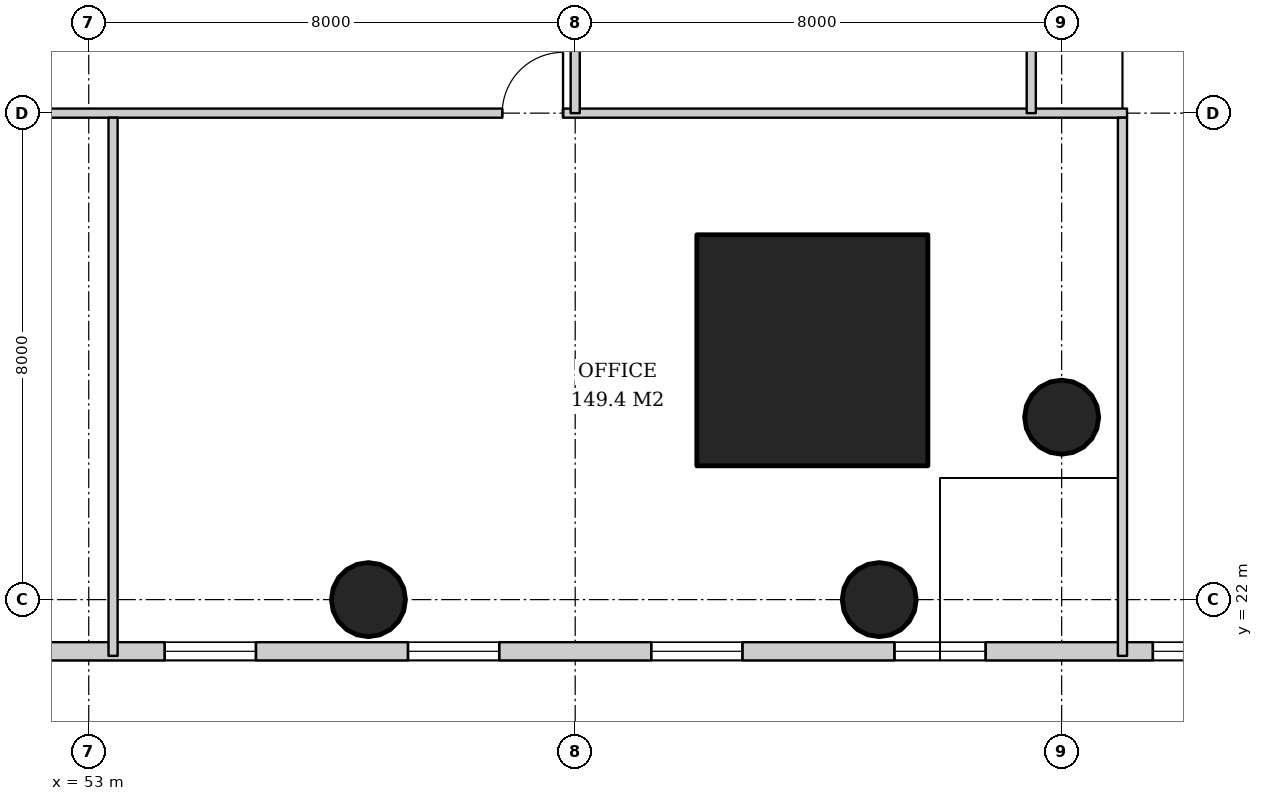
"""IFC4 building model, lengths in metres.
Left out: names, types, materials, properties, quantities, classifications, styles, units other than length and angle.
Written with IfcOpenShell. Run it as: python <this file> out.ifc"""

import sys

from ifc_helpers import new_model, si_unit, direction, frame, frame_2d, origin, origin_2d, place, context, subcontext, project, spatial, rectangle, hollow_circle, extrude, element, fill, save


model = new_model("IFC4")
c1 = context("Model", 3, precision=1e-05, world=origin(), true_north=direction((0.0, 1.0)))
c2 = subcontext(c1, "Body", "Model", "MODEL_VIEW")
j1 = project(units=[si_unit("LENGTHUNIT", "METRE"), si_unit("PLANEANGLEUNIT", "RADIAN")], contexts=[c1])
p1 = place(None, origin())
s1 = spatial("IfcSite", under=j1, at=p1, CompositionType="ELEMENT")
p2 = place(p1, origin())
s2 = spatial("IfcBuilding", under=s1, at=p2, CompositionType="ELEMENT")
p3 = place(p2, frame((0.0, 0.0, 16.0)))
s3 = spatial("IfcBuildingStorey", under=s2, at=p3, CompositionType="ELEMENT", Elevation=16.0)
p4 = place(p3, frame((69.0, 25.0, 0.0), z_axis=(0.0, 0.0, 1.0), x_axis=(1.0, 0.0, 0.0)))
e1 = element("IfcColumn", 1, at=p4, inside=s3, PredefinedType="COLUMN", context=c2, shape_type="SweptSolid", body=[
    extrude(hollow_circle(Radius=0.61, WallThickness=0.04, at=origin_2d()), origin(), (0.0, 0.0, 1.0), 5.0),
])
p5 = place(p3, frame((64.9, 26.1, 0.0), z_axis=(0.0, 0.0, 1.0), x_axis=(1.0, 0.0, 0.0)))
e2 = element("IfcColumn", 2, at=p5, inside=s3, PredefinedType="COLUMN", context=c2, shape_type="SweptSolid", body=[
    extrude(rectangle(XDim=3.8, YDim=3.8, at=origin_2d()), origin(), (0.0, 0.0, 1.0), 5.0),
])
for number, where, z_axis, x_axis in (
    (3, (66.0, 22.0, 0.0), (0.0, 0.0, 1.0), (1.0, 0.0, 0.0)),
    (4, (57.6, 22.0, 0.0), (0.0, 0.0, 1.0), (1.0, 0.0, 0.0)),
):
    element("IfcColumn", number, at=place(p3, frame(where, z_axis=z_axis, x_axis=x_axis)), inside=s3, PredefinedType="COLUMN", context=c2, shape_type="SweptSolid", body=[
        extrude(hollow_circle(Radius=0.61, WallThickness=0.04, at=origin_2d()), origin(), (0.0, 0.0, 1.0), 5.0),
    ])
p6 = place(p3, frame((20.0, 21.15, 0.0), z_axis=(0.0, 0.0, 1.0), x_axis=(1.0, 0.0, 0.0)))
e5 = element("IfcWall", 5, at=p6, inside=s3, PredefinedType="SOLIDWALL", context=c2, shape_type="SweptSolid", body=[
    extrude(rectangle(XDim=58.0, YDim=0.3, at=frame_2d((29.0, 0.0))), origin(), (0.0, 0.0, 1.0), 4.7),
])
p7 = place(p6, frame((1.5, 0.0, 0.9)))
e6 = element("IfcOpeningElement", 6, at=p7, cuts=e5, PredefinedType="OPENING", context=c2, shape_type="SweptSolid", body=[
    extrude(rectangle(XDim=1.5, YDim=3.2, at=frame_2d((0.75, 1.6))), frame((0.0, 0.16, 0.0), z_axis=(0.0, -1.0, 0.0), x_axis=(1.0, 0.0, 0.0)), (0.0, 0.0, 1.0), 0.32),
])
p8 = place(p6, frame((6.0, 0.0, 0.9)))
e7 = element("IfcOpeningElement", 7, at=p8, cuts=e5, PredefinedType="OPENING", context=c2, shape_type="SweptSolid", body=[
    extrude(rectangle(XDim=1.5, YDim=3.2, at=frame_2d((0.75, 1.6))), frame((0.0, 0.16, 0.0), z_axis=(0.0, -1.0, 0.0), x_axis=(1.0, 0.0, 0.0)), (0.0, 0.0, 1.0), 0.32),
])
p9 = place(p6, frame((10.25, 0.0, 0.9)))
e8 = element("IfcOpeningElement", 8, at=p9, cuts=e5, PredefinedType="OPENING", context=c2, shape_type="SweptSolid", body=[
    extrude(rectangle(XDim=1.5, YDim=3.2, at=frame_2d((0.75, 1.6))), frame((0.0, 0.16, 0.0), z_axis=(0.0, -1.0, 0.0), x_axis=(1.0, 0.0, 0.0)), (0.0, 0.0, 1.0), 0.32),
])
p10 = place(p6, frame((14.25, 0.0, 0.9)))
e9 = element("IfcOpeningElement", 9, at=p10, cuts=e5, PredefinedType="OPENING", context=c2, shape_type="SweptSolid", body=[
    extrude(rectangle(XDim=1.5, YDim=3.2, at=frame_2d((0.75, 1.6))), frame((0.0, 0.16, 0.0), z_axis=(0.0, -1.0, 0.0), x_axis=(1.0, 0.0, 0.0)), (0.0, 0.0, 1.0), 0.32),
])
p11 = place(p6, frame((18.25, 0.0, 0.9)))
e10 = element("IfcOpeningElement", 10, at=p11, cuts=e5, PredefinedType="OPENING", context=c2, shape_type="SweptSolid", body=[
    extrude(rectangle(XDim=1.5, YDim=3.2, at=frame_2d((0.75, 1.6))), frame((0.0, 0.16, 0.0), z_axis=(0.0, -1.0, 0.0), x_axis=(1.0, 0.0, 0.0)), (0.0, 0.0, 1.0), 0.32),
])
p12 = place(p6, frame((22.25, 0.0, 0.9)))
e11 = element("IfcOpeningElement", 11, at=p12, cuts=e5, PredefinedType="OPENING", context=c2, shape_type="SweptSolid", body=[
    extrude(rectangle(XDim=1.5, YDim=3.2, at=frame_2d((0.75, 1.6))), frame((0.0, 0.16, 0.0), z_axis=(0.0, -1.0, 0.0), x_axis=(1.0, 0.0, 0.0)), (0.0, 0.0, 1.0), 0.32),
])
p13 = place(p6, frame((26.25, 0.0, 0.9)))
e12 = element("IfcOpeningElement", 12, at=p13, cuts=e5, PredefinedType="OPENING", context=c2, shape_type="SweptSolid", body=[
    extrude(rectangle(XDim=1.5, YDim=3.2, at=frame_2d((0.75, 1.6))), frame((0.0, 0.16, 0.0), z_axis=(0.0, -1.0, 0.0), x_axis=(1.0, 0.0, 0.0)), (0.0, 0.0, 1.0), 0.32),
])
p14 = place(p6, frame((30.25, 0.0, 0.9)))
e13 = element("IfcOpeningElement", 13, at=p14, cuts=e5, PredefinedType="OPENING", context=c2, shape_type="SweptSolid", body=[
    extrude(rectangle(XDim=1.5, YDim=3.2, at=frame_2d((0.75, 1.6))), frame((0.0, 0.16, 0.0), z_axis=(0.0, -1.0, 0.0), x_axis=(1.0, 0.0, 0.0)), (0.0, 0.0, 1.0), 0.32),
])
p15 = place(p6, frame((34.25, 0.0, 0.9)))
e14 = element("IfcOpeningElement", 14, at=p15, cuts=e5, PredefinedType="OPENING", context=c2, shape_type="SweptSolid", body=[
    extrude(rectangle(XDim=1.5, YDim=3.2, at=frame_2d((0.75, 1.6))), frame((0.0, 0.16, 0.0), z_axis=(0.0, -1.0, 0.0), x_axis=(1.0, 0.0, 0.0)), (0.0, 0.0, 1.0), 0.32),
])
p16 = place(p6, frame((38.25, 0.0, 0.9)))
e15 = element("IfcOpeningElement", 15, at=p16, cuts=e5, PredefinedType="OPENING", context=c2, shape_type="SweptSolid", body=[
    extrude(rectangle(XDim=1.5, YDim=3.2, at=frame_2d((0.75, 1.6))), frame((0.0, 0.16, 0.0), z_axis=(0.0, -1.0, 0.0), x_axis=(1.0, 0.0, 0.0)), (0.0, 0.0, 1.0), 0.32),
])
p17 = place(p6, frame((42.25, 0.0, 0.9)))
e16 = element("IfcOpeningElement", 16, at=p17, cuts=e5, PredefinedType="OPENING", context=c2, shape_type="SweptSolid", body=[
    extrude(rectangle(XDim=1.5, YDim=3.2, at=frame_2d((0.75, 1.6))), frame((0.0, 0.16, 0.0), z_axis=(0.0, -1.0, 0.0), x_axis=(1.0, 0.0, 0.0)), (0.0, 0.0, 1.0), 0.32),
])
p18 = place(p6, frame((46.25, 0.0, 0.9)))
e17 = element("IfcOpeningElement", 17, at=p18, cuts=e5, PredefinedType="OPENING", context=c2, shape_type="SweptSolid", body=[
    extrude(rectangle(XDim=1.5, YDim=3.2, at=frame_2d((0.75, 1.6))), frame((0.0, 0.16, 0.0), z_axis=(0.0, -1.0, 0.0), x_axis=(1.0, 0.0, 0.0)), (0.0, 0.0, 1.0), 0.32),
])
p19 = place(p6, frame((50.5, 0.0, 0.9)))
e18 = element("IfcOpeningElement", 18, at=p19, cuts=e5, PredefinedType="OPENING", context=c2, shape_type="SweptSolid", body=[
    extrude(rectangle(XDim=1.5, YDim=3.2, at=frame_2d((0.75, 1.6))), frame((0.0, 0.16, 0.0), z_axis=(0.0, -1.0, 0.0), x_axis=(1.0, 0.0, 0.0)), (0.0, 0.0, 1.0), 0.32),
])
p20 = place(p6, frame((55.0, 0.0, 0.9)))
e19 = element("IfcOpeningElement", 19, at=p20, cuts=e5, PredefinedType="OPENING", context=c2, shape_type="SweptSolid", body=[
    extrude(rectangle(XDim=1.5, YDim=3.2, at=frame_2d((0.75, 1.6))), frame((0.0, 0.16, 0.0), z_axis=(0.0, -1.0, 0.0), x_axis=(1.0, 0.0, 0.0)), (0.0, 0.0, 1.0), 0.32),
])
p21 = place(p3, frame((19.925, 30.0, 0.0), z_axis=(0.0, 0.0, 1.0), x_axis=(1.0, 0.0, 0.0)))
e20 = element("IfcWall", 20, at=p21, inside=s3, PredefinedType="PARTITIONING", context=c2, shape_type="SweptSolid", body=[
    extrude(rectangle(XDim=50.15, YDim=0.15, at=frame_2d((25.075, 0.0))), origin(), (0.0, 0.0, 1.0), 3.688),
])
p22 = place(p21, frame((7.625, 0.0, 0.0)))
e21 = element("IfcOpeningElement", 21, at=p22, cuts=e20, PredefinedType="OPENING", context=c2, shape_type="SweptSolid", body=[
    extrude(rectangle(XDim=1.5, YDim=2.1, at=frame_2d((0.75, 1.05))), frame((0.0, 0.085, 0.0), z_axis=(0.0, -1.0, 0.0), x_axis=(1.0, 0.0, 0.0)), (0.0, 0.0, 1.0), 0.17),
])
p23 = place(p21, frame((20.375, 0.0, 0.0)))
e22 = element("IfcOpeningElement", 22, at=p23, cuts=e20, PredefinedType="OPENING", context=c2, shape_type="SweptSolid", body=[
    extrude(rectangle(XDim=1.0, YDim=2.1, at=frame_2d((0.5, 1.05))), frame((0.0, 0.085, 0.0), z_axis=(0.0, -1.0, 0.0), x_axis=(1.0, 0.0, 0.0)), (0.0, 0.0, 1.0), 0.17),
])
p24 = place(p21, frame((28.775, 0.0, 0.0)))
e23 = element("IfcOpeningElement", 23, at=p24, cuts=e20, PredefinedType="OPENING", context=c2, shape_type="SweptSolid", body=[
    extrude(rectangle(XDim=1.0, YDim=2.1, at=frame_2d((0.5, 1.05))), frame((0.0, 0.085, 0.0), z_axis=(0.0, -1.0, 0.0), x_axis=(1.0, 0.0, 0.0)), (0.0, 0.0, 1.0), 0.17),
])
p25 = place(p21, frame((39.875, 0.0, 0.0)))
e24 = element("IfcOpeningElement", 24, at=p25, cuts=e20, PredefinedType="OPENING", context=c2, shape_type="SweptSolid", body=[
    extrude(rectangle(XDim=1.0, YDim=2.1, at=frame_2d((0.5, 1.05))), frame((0.0, 0.085, 0.0), z_axis=(0.0, -1.0, 0.0), x_axis=(1.0, 0.0, 0.0)), (0.0, 0.0, 1.0), 0.17),
])
p26 = place(p3, frame((70.0, 21.075, 0.0), z_axis=(0.0, 0.0, 1.0), x_axis=(0.0, 1.0, 0.0)))
e25 = element("IfcWall", 25, at=p26, inside=s3, PredefinedType="PARTITIONING", context=c2, shape_type="SweptSolid", body=[
    extrude(rectangle(XDim=8.85, YDim=0.15, at=frame_2d((4.425, 0.0))), origin(), (0.0, 0.0, 1.0), 4.7),
])
p27 = place(p3, frame((53.4, 21.075, 0.0), z_axis=(0.0, 0.0, 1.0), x_axis=(0.0, 1.0, 0.0)))
e26 = element("IfcWall", 26, at=p27, inside=s3, PredefinedType="PARTITIONING", context=c2, shape_type="SweptSolid", body=[
    extrude(rectangle(XDim=8.85, YDim=0.15, at=frame_2d((4.425, 0.0))), origin(), (0.0, 0.0, 1.0), 4.1),
])
p28 = place(p3, frame((61.0, 30.0, 0.0), z_axis=(0.0, 0.0, 1.0), x_axis=(0.0, 1.0, 0.0)))
e27 = element("IfcWall", 27, at=p28, inside=s3, PredefinedType="PARTITIONING", context=c2, shape_type="SweptSolid", body=[
    extrude(rectangle(XDim=32.0, YDim=0.15, at=frame_2d((16.0, 0.0))), origin(), (0.0, 0.0, 1.0), 3.688),
])
p29 = place(p28, frame((7.5, 0.0, 0.0)))
e28 = element("IfcOpeningElement", 28, at=p29, cuts=e27, PredefinedType="OPENING", context=c2, shape_type="SweptSolid", body=[
    extrude(rectangle(XDim=1.0, YDim=2.1, at=frame_2d((0.5, 1.05))), frame((0.0, 0.085, 0.0), z_axis=(0.0, -1.0, 0.0), x_axis=(1.0, 0.0, 0.0)), (0.0, 0.0, 1.0), 0.17),
])
p30 = place(p28, frame((23.5, 0.0, 0.0)))
e29 = element("IfcOpeningElement", 29, at=p30, cuts=e27, PredefinedType="OPENING", context=c2, shape_type="SweptSolid", body=[
    extrude(rectangle(XDim=1.0, YDim=2.1, at=frame_2d((0.5, 1.05))), frame((0.0, 0.085, 0.0), z_axis=(0.0, -1.0, 0.0), x_axis=(1.0, 0.0, 0.0)), (0.0, 0.0, 1.0), 0.17),
])
p31 = place(p3, frame((68.5, 30.0, 0.0), z_axis=(0.0, 0.0, 1.0), x_axis=(0.0, 1.0, 0.0)))
e30 = element("IfcWall", 30, at=p31, inside=s3, PredefinedType="PARTITIONING", context=c2, shape_type="SweptSolid", body=[
    extrude(rectangle(XDim=2.791, YDim=0.15, at=frame_2d((1.395, 0.0))), origin(), (0.0, 0.0, 1.0), 4.7),
])
p32 = place(p15, origin())
e31 = element("IfcWindow", 31, at=p32, inside=s3, PartitioningType="SINGLE_PANEL", PredefinedType="WINDOW", context=c2, shape_type="SweptSolid", body=[
    extrude(rectangle(XDim=1.5, YDim=3.2, at=frame_2d((0.75, 1.6))), frame((0.0, 0.03, 0.0), z_axis=(0.0, -1.0, 0.0), x_axis=(1.0, 0.0, 0.0)), (0.0, 0.0, 1.0), 0.06),
])
fill(e14, e31)
p33 = place(p16, origin())
e32 = element("IfcWindow", 32, at=p33, inside=s3, PartitioningType="SINGLE_PANEL", PredefinedType="WINDOW", context=c2, shape_type="SweptSolid", body=[
    extrude(rectangle(XDim=1.5, YDim=3.2, at=frame_2d((0.75, 1.6))), frame((0.0, 0.03, 0.0), z_axis=(0.0, -1.0, 0.0), x_axis=(1.0, 0.0, 0.0)), (0.0, 0.0, 1.0), 0.06),
])
fill(e15, e32)
p34 = place(p17, origin())
e33 = element("IfcWindow", 33, at=p34, inside=s3, PartitioningType="SINGLE_PANEL", PredefinedType="WINDOW", context=c2, shape_type="SweptSolid", body=[
    extrude(rectangle(XDim=1.5, YDim=3.2, at=frame_2d((0.75, 1.6))), frame((0.0, 0.03, 0.0), z_axis=(0.0, -1.0, 0.0), x_axis=(1.0, 0.0, 0.0)), (0.0, 0.0, 1.0), 0.06),
])
fill(e16, e33)
p35 = place(p18, origin())
e34 = element("IfcWindow", 34, at=p35, inside=s3, PartitioningType="SINGLE_PANEL", PredefinedType="WINDOW", context=c2, shape_type="SweptSolid", body=[
    extrude(rectangle(XDim=1.5, YDim=3.2, at=frame_2d((0.75, 1.6))), frame((0.0, 0.03, 0.0), z_axis=(0.0, -1.0, 0.0), x_axis=(1.0, 0.0, 0.0)), (0.0, 0.0, 1.0), 0.06),
])
fill(e17, e34)
p36 = place(p19, origin())
e35 = element("IfcWindow", 35, at=p36, inside=s3, PartitioningType="SINGLE_PANEL", PredefinedType="WINDOW", context=c2, shape_type="SweptSolid", body=[
    extrude(rectangle(XDim=1.5, YDim=3.2, at=frame_2d((0.75, 1.6))), frame((0.0, 0.03, 0.0), z_axis=(0.0, -1.0, 0.0), x_axis=(1.0, 0.0, 0.0)), (0.0, 0.0, 1.0), 0.06),
])
fill(e18, e35)
p37 = place(p25, origin())
e36 = element("IfcDoor", 36, at=p37, inside=s3, OperationType="SINGLE_SWING_RIGHT", PredefinedType="DOOR", context=c2, shape_type="SweptSolid", body=[
    extrude(rectangle(XDim=1.0, YDim=2.1, at=frame_2d((0.5, 1.05))), frame((0.0, 0.025, 0.0), z_axis=(0.0, -1.0, 0.0), x_axis=(1.0, 0.0, 0.0)), (0.0, 0.0, 1.0), 0.05),
])
fill(e24, e36)
save(model, sys.argv[1])
